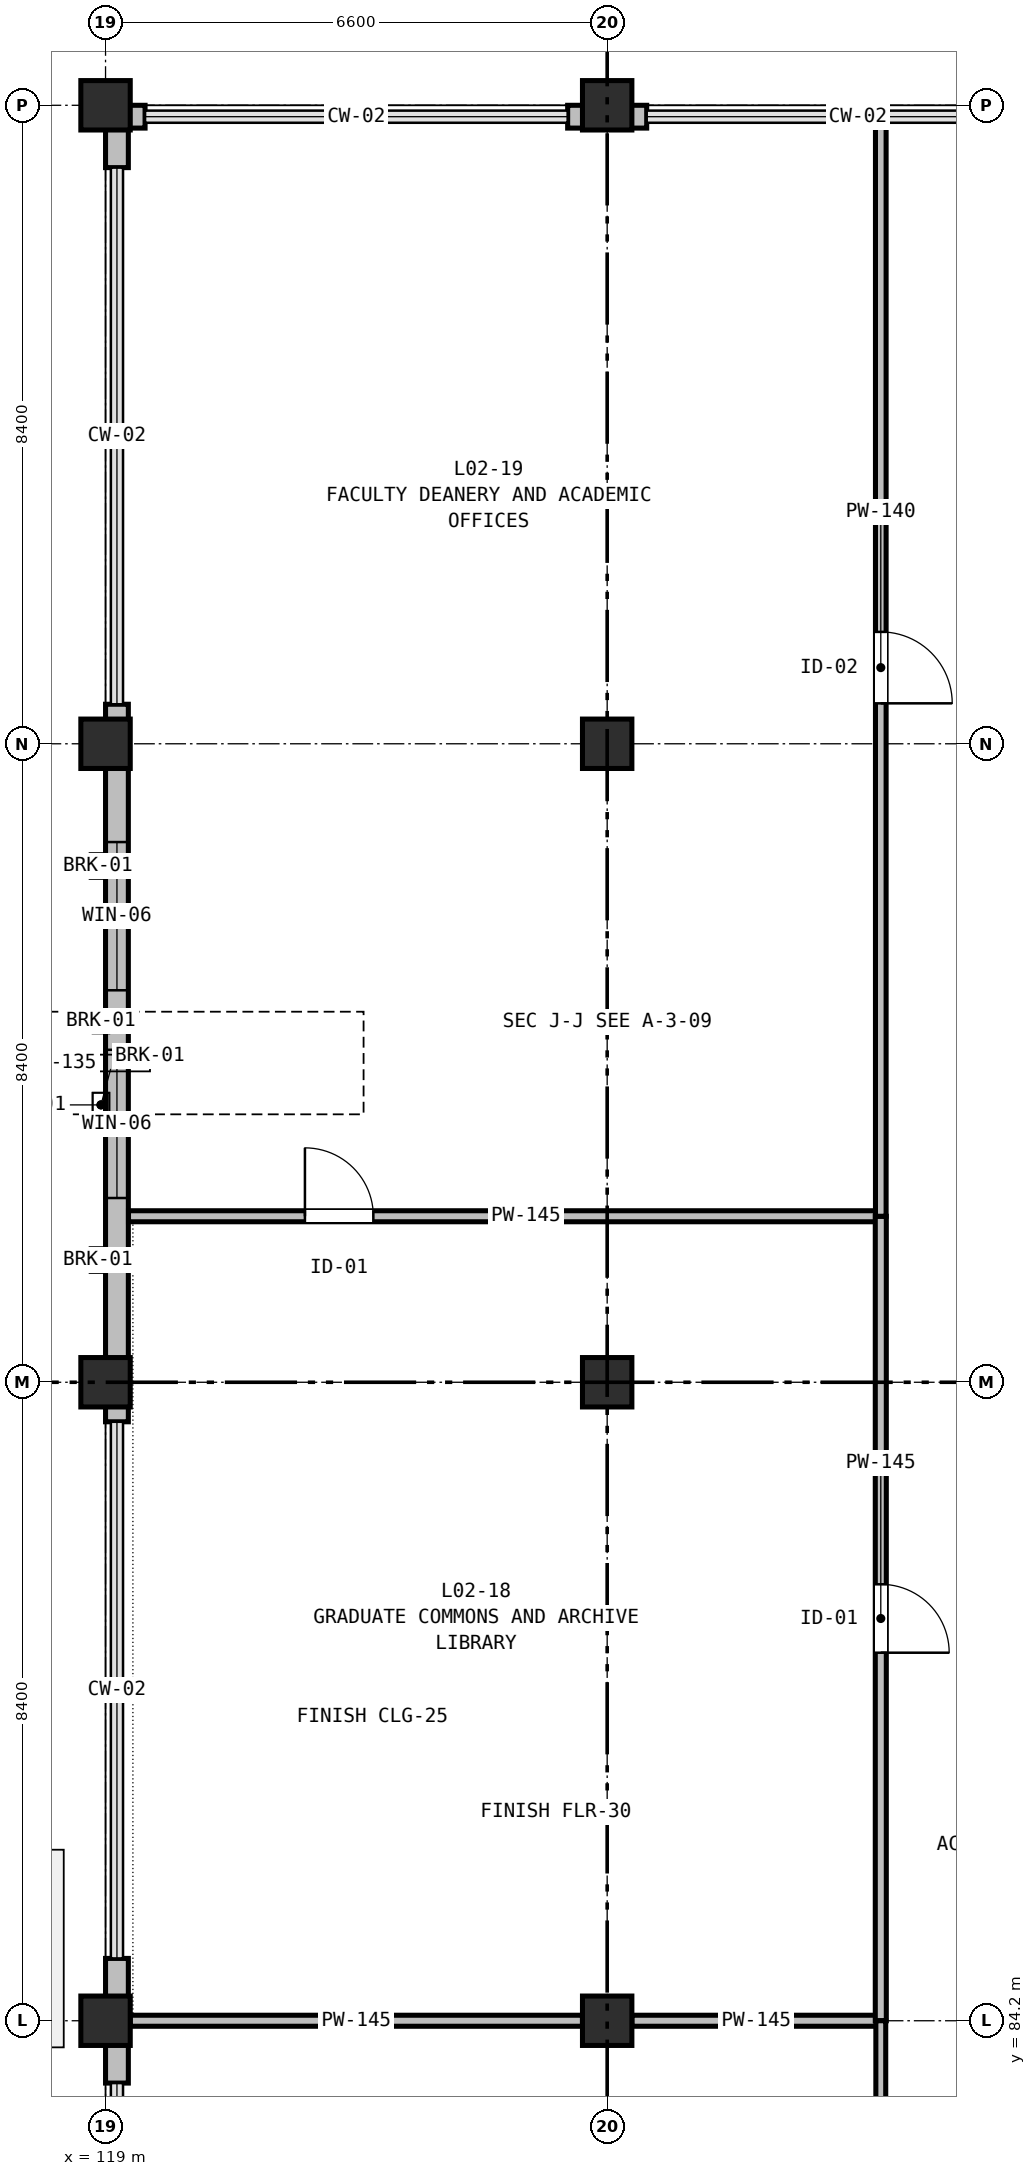
"""IFC4 building model, lengths in metres.
Left out: names, types, materials, properties, quantities, classifications, styles, units other than length and angle.
Written with IfcOpenShell. Run it as: python <this file> out.ifc"""

import sys

from ifc_helpers import new_model, si_unit, direction, frame, frame_2d, origin, origin_2d, place, context, subcontext, project, spatial, rectangle, extrude, element, fill, save


model = new_model("IFC4")
c1 = context("Model", 3, precision=1e-05, world=origin(), true_north=direction((0.0, 1.0)))
c2 = subcontext(c1, "Body", "Model", "MODEL_VIEW")
j1 = project(units=[si_unit("LENGTHUNIT", "METRE"), si_unit("PLANEANGLEUNIT", "RADIAN")], contexts=[c1])
p1 = place(None, origin())
s1 = spatial("IfcSite", under=j1, at=p1, CompositionType="ELEMENT")
p2 = place(p1, origin())
s2 = spatial("IfcBuilding", under=s1, at=p2, CompositionType="ELEMENT")
p3 = place(p2, frame((0.0, 0.0, 10.2)))
s3 = spatial("IfcBuildingStorey", under=s2, at=p3, CompositionType="ELEMENT", Elevation=10.2)
for number, where, z_axis, x_axis in (
    (1, (119.0, 84.2, 0.0), (0.0, 0.0, 1.0), (1.0, 0.0, 0.0)),
    (2, (119.0, 92.6, 0.0), (0.0, 0.0, 1.0), (1.0, 0.0, 0.0)),
    (3, (119.0, 101.0, 0.0), (0.0, 0.0, 1.0), (1.0, 0.0, 0.0)),
    (4, (119.0, 109.4, 0.0), (0.0, 0.0, 1.0), (1.0, 0.0, 0.0)),
    (5, (125.6, 84.2, 0.0), (0.0, 0.0, 1.0), (1.0, 0.0, 0.0)),
    (6, (125.6, 92.6, 0.0), (0.0, 0.0, 1.0), (1.0, 0.0, 0.0)),
    (7, (125.6, 101.0, 0.0), (0.0, 0.0, 1.0), (1.0, 0.0, 0.0)),
    (8, (125.6, 109.4, 0.0), (0.0, 0.0, 1.0), (1.0, 0.0, 0.0)),
):
    element("IfcColumn", number, at=place(p3, frame(where, z_axis=z_axis, x_axis=x_axis)), inside=s3, PredefinedType="COLUMN", context=c2, shape_type="SweptSolid", body=[
        extrude(rectangle(XDim=0.65, YDim=0.65, at=origin_2d()), origin(), (0.0, 0.0, 1.0), 4.74),
    ])
for number, where, z_axis, x_axis in (
    (9, (119.15, 83.38, 0.0), (0.0, 0.0, 1.0), (0.0, 1.0, 0.0)),
    (10, (119.15, 84.5, 0.0), (0.0, 0.0, 1.0), (0.0, 1.0, 0.0)),
    (11, (119.15, 92.08, 0.0), (0.0, 0.0, 1.0), (0.0, 1.0, 0.0)),
):
    element("IfcWall", number, at=place(p3, frame(where, z_axis=z_axis, x_axis=x_axis)), inside=s3, PredefinedType="STANDARD", context=c2, shape_type="SweptSolid", body=[
        extrude(rectangle(XDim=0.52, YDim=0.3, at=frame_2d((0.26, 0.0))), origin(), (0.0, 0.0, 1.0), 3.935),
    ])
p4 = place(p3, frame((119.15, 92.6, 0.0), z_axis=(0.0, 0.0, 1.0), x_axis=(0.0, 1.0, 0.0)))
e12 = element("IfcWall", 12, at=p4, inside=s3, PredefinedType="STANDARD", context=c2, shape_type="SweptSolid", body=[
    extrude(rectangle(XDim=8.4, YDim=0.3, at=frame_2d((4.2, 0.0))), origin(), (0.0, 0.0, 1.0), 3.935),
])
p5 = place(p4, frame((2.424, 0.0, 0.9)))
e13 = element("IfcOpeningElement", 13, at=p5, cuts=e12, PredefinedType="OPENING", context=c2, shape_type="SweptSolid", body=[
    extrude(rectangle(XDim=1.95, YDim=2.1, at=frame_2d((0.975, 1.05))), frame((0.0, 0.16, 0.0), z_axis=(0.0, -1.0, 0.0), x_axis=(1.0, 0.0, 0.0)), (0.0, 0.0, 1.0), 0.32),
])
p6 = place(p4, frame((5.157, 0.0, 0.9)))
e14 = element("IfcOpeningElement", 14, at=p6, cuts=e12, PredefinedType="OPENING", context=c2, shape_type="SweptSolid", body=[
    extrude(rectangle(XDim=1.95, YDim=2.1, at=frame_2d((0.975, 1.05))), frame((0.0, 0.16, 0.0), z_axis=(0.0, -1.0, 0.0), x_axis=(1.0, 0.0, 0.0)), (0.0, 0.0, 1.0), 0.32),
])
for number, where, z_axis, x_axis in (
    (15, (119.15, 101.0, 0.0), (0.0, 0.0, 1.0), (0.0, 1.0, 0.0)),
    (16, (119.15, 108.58, 0.0), (0.0, 0.0, 1.0), (0.0, 1.0, 0.0)),
    (17, (119.0, 109.25, 0.0), (0.0, 0.0, 1.0), (1.0, 0.0, 0.0)),
    (18, (125.08, 109.25, 0.0), (0.0, 0.0, 1.0), (1.0, 0.0, 0.0)),
    (19, (125.6, 109.25, 0.0), (0.0, 0.0, 1.0), (1.0, 0.0, 0.0)),
):
    element("IfcWall", number, at=place(p3, frame(where, z_axis=z_axis, x_axis=x_axis)), inside=s3, PredefinedType="STANDARD", context=c2, shape_type="SweptSolid", body=[
        extrude(rectangle(XDim=0.52, YDim=0.3, at=frame_2d((0.26, 0.0))), origin(), (0.0, 0.0, 1.0), 3.935),
    ])
p7 = place(p3, frame((129.2, 84.2, 0.0), z_axis=(0.0, 0.0, 1.0), x_axis=(-1.0, 0.0, 0.0)))
e20 = element("IfcWall", 20, at=p7, inside=s3, PredefinedType="PARTITIONING", context=c2, shape_type="SweptSolid", body=[
    extrude(rectangle(XDim=3.275, YDim=0.145, at=frame_2d((1.637, 0.0))), origin(), (0.0, 0.0, 1.0), 4.135),
])
p8 = place(p3, frame((125.275, 84.2, 0.0), z_axis=(0.0, 0.0, 1.0), x_axis=(-1.0, 0.0, 0.0)))
e21 = element("IfcWall", 21, at=p8, inside=s3, PredefinedType="PARTITIONING", context=c2, shape_type="SweptSolid", body=[
    extrude(rectangle(XDim=5.95, YDim=0.145, at=frame_2d((2.975, 0.0))), origin(), (0.0, 0.0, 1.0), 4.135),
])
p9 = place(p3, frame((119.302, 94.784, 0.0), z_axis=(0.0, 0.0, 1.0), x_axis=(1.0, 0.0, 0.0)))
e22 = element("IfcWall", 22, at=p9, inside=s3, PredefinedType="PARTITIONING", context=c2, shape_type="SweptSolid", body=[
    extrude(rectangle(XDim=9.898, YDim=0.145, at=frame_2d((4.949, 0.0))), origin(), (0.0, 0.0, 1.0), 3.935),
])
p10 = place(p9, frame((2.321, 0.0, 0.0)))
e23 = element("IfcOpeningElement", 23, at=p10, cuts=e22, PredefinedType="OPENING", context=c2, shape_type="SweptSolid", body=[
    extrude(rectangle(XDim=0.9, YDim=2.02, at=frame_2d((0.45, 1.01))), frame((0.0, 0.083, 0.0), z_axis=(0.0, -1.0, 0.0), x_axis=(1.0, 0.0, 0.0)), (0.0, 0.0, 1.0), 0.165),
])
p11 = place(p3, frame((129.2, 94.784, 0.0), z_axis=(0.0, 0.0, 1.0), x_axis=(0.0, -1.0, 0.0)))
e24 = element("IfcWall", 24, at=p11, inside=s3, PredefinedType="PARTITIONING", context=c2, shape_type="SweptSolid", body=[
    extrude(rectangle(XDim=10.584, YDim=0.145, at=frame_2d((5.292, 0.0))), origin(), (0.0, 0.0, 1.0), 4.135),
])
p12 = place(p11, frame((4.842, 0.0, 0.0)))
e25 = element("IfcOpeningElement", 25, at=p12, cuts=e24, PredefinedType="OPENING", context=c2, shape_type="SweptSolid", body=[
    extrude(rectangle(XDim=0.9, YDim=2.02, at=frame_2d((0.45, 1.01))), frame((0.0, 0.083, 0.0), z_axis=(0.0, -1.0, 0.0), x_axis=(1.0, 0.0, 0.0)), (0.0, 0.0, 1.0), 0.165),
])
p13 = place(p3, frame((129.2, 109.22, 0.0), z_axis=(0.0, 0.0, 1.0), x_axis=(0.0, -1.0, 0.0)))
e26 = element("IfcWall", 26, at=p13, inside=s3, PredefinedType="PARTITIONING", context=c2, shape_type="SweptSolid", body=[
    extrude(rectangle(XDim=14.436, YDim=0.14, at=frame_2d((7.218, 0.0))), origin(), (0.0, 0.0, 1.0), 4.085),
])
p14 = place(p13, frame((6.748, 0.0, 0.0)))
e27 = element("IfcOpeningElement", 27, at=p14, cuts=e26, PredefinedType="OPENING", context=c2, shape_type="SweptSolid", body=[
    extrude(rectangle(XDim=0.94, YDim=2.02, at=frame_2d((0.47, 1.01))), frame((0.0, 0.08, 0.0), z_axis=(0.0, -1.0, 0.0), x_axis=(1.0, 0.0, 0.0)), (0.0, 0.0, 1.0), 0.16),
])
p15 = place(p3, frame((129.2, 84.2, 0.0), z_axis=(0.0, 0.0, 1.0), x_axis=(0.0, -1.0, 0.0)))
e28 = element("IfcWall", 28, at=p15, inside=s3, PredefinedType="PARTITIONING", context=c2, shape_type="SweptSolid", body=[
    extrude(rectangle(XDim=8.8, YDim=0.13, at=frame_2d((4.4, 0.0))), origin(), (0.0, 0.0, 1.0), 4.135),
])
p16 = place(p15, frame((3.91, 0.0, 0.0)))
e29 = element("IfcOpeningElement", 29, at=p16, cuts=e28, PredefinedType="OPENING", context=c2, shape_type="SweptSolid", body=[
    extrude(rectangle(XDim=0.98, YDim=2.02, at=frame_2d((0.49, 1.01))), frame((0.0, 0.075, 0.0), z_axis=(0.0, -1.0, 0.0), x_axis=(1.0, 0.0, 0.0)), (0.0, 0.0, 1.0), 0.15),
])
p17 = place(p5, origin())
e30 = element("IfcWindow", 30, at=p17, inside=s3, PartitioningType="SINGLE_PANEL", PredefinedType="WINDOW", context=c2, shape_type="SweptSolid", body=[
    extrude(rectangle(XDim=1.95, YDim=2.1, at=frame_2d((0.975, 1.05))), frame((0.0, 0.03, 0.0), z_axis=(0.0, -1.0, 0.0), x_axis=(1.0, 0.0, 0.0)), (0.0, 0.0, 1.0), 0.06),
])
fill(e13, e30)
p18 = place(p6, origin())
e31 = element("IfcWindow", 31, at=p18, inside=s3, PartitioningType="SINGLE_PANEL", PredefinedType="WINDOW", context=c2, shape_type="SweptSolid", body=[
    extrude(rectangle(XDim=1.95, YDim=2.1, at=frame_2d((0.975, 1.05))), frame((0.0, 0.03, 0.0), z_axis=(0.0, -1.0, 0.0), x_axis=(1.0, 0.0, 0.0)), (0.0, 0.0, 1.0), 0.06),
])
fill(e14, e31)
p19 = place(p12, origin())
e32 = element("IfcDoor", 32, at=p19, inside=s3, OperationType="SINGLE_SWING_RIGHT", PredefinedType="DOOR", context=c2, shape_type="SweptSolid", body=[
    extrude(rectangle(XDim=0.9, YDim=2.02, at=frame_2d((0.45, 1.01))), frame((0.0, 0.025, 0.0), z_axis=(0.0, -1.0, 0.0), x_axis=(1.0, 0.0, 0.0)), (0.0, 0.0, 1.0), 0.05),
])
fill(e25, e32)
p20 = place(p10, origin())
e33 = element("IfcDoor", 33, at=p20, inside=s3, OperationType="SINGLE_SWING_LEFT", PredefinedType="DOOR", context=c2, shape_type="SweptSolid", body=[
    extrude(rectangle(XDim=0.9, YDim=2.02, at=frame_2d((0.45, 1.01))), frame((0.0, 0.025, 0.0), z_axis=(0.0, -1.0, 0.0), x_axis=(1.0, 0.0, 0.0)), (0.0, 0.0, 1.0), 0.05),
])
fill(e23, e33)
p21 = place(p14, origin())
e34 = element("IfcDoor", 34, at=p21, inside=s3, OperationType="SINGLE_SWING_RIGHT", PredefinedType="DOOR", context=c2, shape_type="SweptSolid", body=[
    extrude(rectangle(XDim=0.94, YDim=2.02, at=frame_2d((0.47, 1.01))), frame((0.0, 0.025, 0.0), z_axis=(0.0, -1.0, 0.0), x_axis=(1.0, 0.0, 0.0)), (0.0, 0.0, 1.0), 0.05),
])
fill(e27, e34)
save(model, sys.argv[1])
